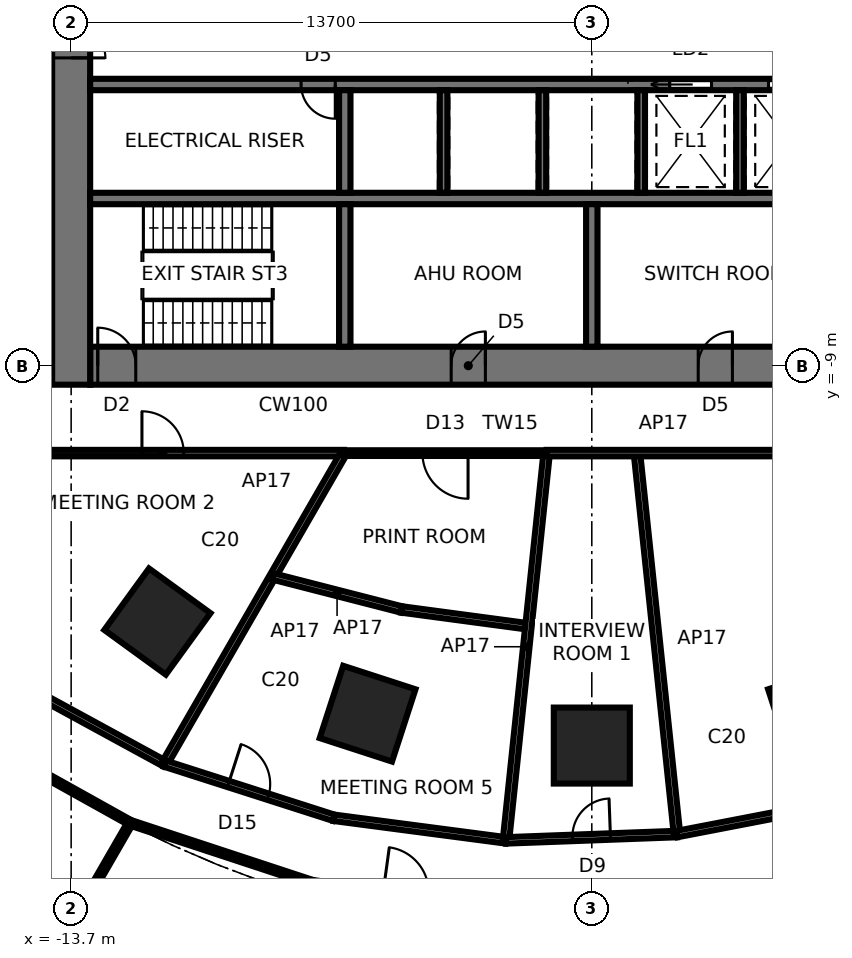
"""IFC4 building model, lengths in metres.
Left out: names, types, materials, properties, quantities, classifications, styles, units other than length and angle.
Written with IfcOpenShell. Run it as: python <this file> out.ifc"""

import sys

from ifc_helpers import new_model, si_unit, direction, frame, frame_2d, origin, origin_2d, place, context, subcontext, project, spatial, rectangle, extrude, element, fill, save


model = new_model("IFC4")
c1 = context("Model", 3, precision=1e-05, world=origin(), true_north=direction((0.0, 1.0)))
c2 = subcontext(c1, "Body", "Model", "MODEL_VIEW")
j1 = project(units=[si_unit("LENGTHUNIT", "METRE"), si_unit("PLANEANGLEUNIT", "RADIAN")], contexts=[c1])
p1 = place(None, origin())
s1 = spatial("IfcSite", under=j1, at=p1, CompositionType="ELEMENT")
p2 = place(p1, origin())
s2 = spatial("IfcBuilding", under=s1, at=p2, CompositionType="ELEMENT")
p3 = place(p2, frame((0.0, 0.0, 5.6)))
s3 = spatial("IfcBuildingStorey", under=s2, at=p3, CompositionType="ELEMENT", Elevation=5.6)
for number, where, z_axis, x_axis in (
    (1, (-11.43, -15.733, 0.0), (0.0, 0.0, 1.0), (-0.588, -0.809, 0.0)),
    (2, (-5.9, -18.157, 0.0), (0.0, 0.0, 1.0), (-0.309, -0.951, 0.0)),
    (3, (0.0, -18.996, 0.0), (0.0, 0.0, 1.0), (0.0, -1.0, 0.0)),
    (4, (5.9, -18.157, 0.0), (0.0, 0.0, 1.0), (0.309, -0.951, 0.0)),
):
    element("IfcColumn", number, at=place(p3, frame(where, z_axis=z_axis, x_axis=x_axis)), inside=s3, PredefinedType="COLUMN", context=c2, shape_type="SweptSolid", body=[
        extrude(rectangle(XDim=2.0, YDim=2.0, at=origin_2d()), origin(), (0.0, 0.0, 1.0), 5.0),
    ])
p4 = place(p3, frame((-13.2, -9.0, 0.0), z_axis=(0.0, 0.0, 1.0), x_axis=(1.0, 0.0, 0.0)))
e5 = element("IfcWall", 5, at=p4, inside=s3, PredefinedType="SHEAR", context=c2, shape_type="SweptSolid", body=[
    extrude(rectangle(XDim=26.4, YDim=1.0, at=frame_2d((13.2, 0.0))), origin(), (0.0, 0.0, 1.0), 5.0),
])
p5 = place(p4, frame((0.2, 0.0, 0.0)))
e6 = element("IfcOpeningElement", 6, at=p5, cuts=e5, PredefinedType="OPENING", context=c2, shape_type="SweptSolid", body=[
    extrude(rectangle(XDim=1.0, YDim=2.1, at=frame_2d((0.5, 1.05))), frame((0.0, 0.51, 0.0), z_axis=(0.0, -1.0, 0.0), x_axis=(1.0, 0.0, 0.0)), (0.0, 0.0, 1.0), 1.02),
])
p6 = place(p4, frame((9.5, 0.0, 0.0)))
e7 = element("IfcOpeningElement", 7, at=p6, cuts=e5, PredefinedType="OPENING", context=c2, shape_type="SweptSolid", body=[
    extrude(rectangle(XDim=0.9, YDim=2.1, at=frame_2d((0.45, 1.05))), frame((0.0, 0.51, 0.0), z_axis=(0.0, -1.0, 0.0), x_axis=(1.0, 0.0, 0.0)), (0.0, 0.0, 1.0), 1.02),
])
p7 = place(p4, frame((16.0, 0.0, 0.0)))
e8 = element("IfcOpeningElement", 8, at=p7, cuts=e5, PredefinedType="OPENING", context=c2, shape_type="SweptSolid", body=[
    extrude(rectangle(XDim=0.9, YDim=2.1, at=frame_2d((0.45, 1.05))), frame((0.0, 0.51, 0.0), z_axis=(0.0, -1.0, 0.0), x_axis=(1.0, 0.0, 0.0)), (0.0, 0.0, 1.0), 1.02),
])
p8 = place(p4, frame((22.85, 0.0, 0.0)))
e9 = element("IfcOpeningElement", 9, at=p8, cuts=e5, PredefinedType="OPENING", context=c2, shape_type="SweptSolid", body=[
    extrude(rectangle(XDim=0.9, YDim=2.1, at=frame_2d((0.45, 1.05))), frame((0.0, 0.51, 0.0), z_axis=(0.0, -1.0, 0.0), x_axis=(1.0, 0.0, 0.0)), (0.0, 0.0, 1.0), 1.02),
])
p9 = place(p3, frame((-13.7, 9.5, 0.0), z_axis=(0.0, 0.0, 1.0), x_axis=(0.0, -1.0, 0.0)))
e10 = element("IfcWall", 10, at=p9, inside=s3, PredefinedType="SHEAR", context=c2, shape_type="SweptSolid", body=[
    extrude(rectangle(XDim=19.0, YDim=1.0, at=frame_2d((9.5, 0.0))), origin(), (0.0, 0.0, 1.0), 5.0),
])
p10 = place(p9, frame((8.6, 0.0, 0.0)))
e11 = element("IfcOpeningElement", 11, at=p10, cuts=e10, PredefinedType="OPENING", context=c2, shape_type="SweptSolid", body=[
    extrude(rectangle(XDim=1.8, YDim=2.4, at=frame_2d((0.9, 1.2))), frame((0.0, 0.51, 0.0), z_axis=(0.0, -1.0, 0.0), x_axis=(1.0, 0.0, 0.0)), (0.0, 0.0, 1.0), 1.02),
])
p11 = place(p3, frame((-13.2, -1.6, 0.0), z_axis=(0.0, 0.0, 1.0), x_axis=(1.0, 0.0, 0.0)))
e12 = element("IfcWall", 12, at=p11, inside=s3, PredefinedType="SHEAR", context=c2, shape_type="SweptSolid", body=[
    extrude(rectangle(XDim=26.4, YDim=0.3, at=frame_2d((13.2, 0.0))), origin(), (0.0, 0.0, 1.0), 5.0),
])
p12 = place(p11, frame((25.15, 0.0, 0.0)))
e13 = element("IfcOpeningElement", 13, at=p12, cuts=e12, PredefinedType="OPENING", context=c2, shape_type="SweptSolid", body=[
    extrude(rectangle(XDim=1.0, YDim=2.1, at=frame_2d((0.5, 1.05))), frame((0.0, 0.16, 0.0), z_axis=(0.0, -1.0, 0.0), x_axis=(1.0, 0.0, 0.0)), (0.0, 0.0, 1.0), 0.32),
])
p13 = place(p11, frame((15.25, 0.0, 0.0)))
e14 = element("IfcOpeningElement", 14, at=p13, cuts=e12, PredefinedType="OPENING", context=c2, shape_type="SweptSolid", body=[
    extrude(rectangle(XDim=1.1, YDim=2.3, at=frame_2d((0.55, 1.15))), frame((0.0, 0.16, 0.0), z_axis=(0.0, -1.0, 0.0), x_axis=(1.0, 0.0, 0.0)), (0.0, 0.0, 1.0), 0.32),
])
p14 = place(p11, frame((17.85, 0.0, 0.0)))
e15 = element("IfcOpeningElement", 15, at=p14, cuts=e12, PredefinedType="OPENING", context=c2, shape_type="SweptSolid", body=[
    extrude(rectangle(XDim=1.1, YDim=2.3, at=frame_2d((0.55, 1.15))), frame((0.0, 0.16, 0.0), z_axis=(0.0, -1.0, 0.0), x_axis=(1.0, 0.0, 0.0)), (0.0, 0.0, 1.0), 0.32),
])
p15 = place(p11, frame((5.55, 0.0, 0.0)))
e16 = element("IfcOpeningElement", 16, at=p15, cuts=e12, PredefinedType="OPENING", context=c2, shape_type="SweptSolid", body=[
    extrude(rectangle(XDim=0.9, YDim=2.1, at=frame_2d((0.45, 1.05))), frame((0.0, 0.16, 0.0), z_axis=(0.0, -1.0, 0.0), x_axis=(1.0, 0.0, 0.0)), (0.0, 0.0, 1.0), 0.32),
])
p16 = place(p3, frame((-13.2, -4.6, 0.0), z_axis=(0.0, 0.0, 1.0), x_axis=(1.0, 0.0, 0.0)))
e17 = element("IfcWall", 17, at=p16, inside=s3, PredefinedType="SHEAR", context=c2, shape_type="SweptSolid", body=[
    extrude(rectangle(XDim=26.4, YDim=0.3, at=frame_2d((13.2, 0.0))), origin(), (0.0, 0.0, 1.0), 5.0),
])
p17 = place(p3, frame((-6.5, -1.75, 0.0), z_axis=(0.0, 0.0, 1.0), x_axis=(0.0, -1.0, 0.0)))
e18 = element("IfcWall", 18, at=p17, inside=s3, PredefinedType="SHEAR", context=c2, shape_type="SweptSolid", body=[
    extrude(rectangle(XDim=2.7, YDim=0.3, at=frame_2d((1.35, 0.0))), origin(), (0.0, 0.0, 1.0), 5.0),
])
p18 = place(p3, frame((-6.5, -4.75, 0.0), z_axis=(0.0, 0.0, 1.0), x_axis=(0.0, -1.0, 0.0)))
e19 = element("IfcWall", 19, at=p18, inside=s3, PredefinedType="SHEAR", context=c2, shape_type="SweptSolid", body=[
    extrude(rectangle(XDim=3.75, YDim=0.3, at=frame_2d((1.875, 0.0))), origin(), (0.0, 0.0, 1.0), 5.0),
])
for number, where, z_axis, x_axis in (
    (20, (-3.9, -1.75, 0.0), (0.0, 0.0, 1.0), (0.0, -1.0, 0.0)),
    (21, (-1.3, -1.75, 0.0), (0.0, 0.0, 1.0), (0.0, -1.0, 0.0)),
    (22, (1.3, -1.75, 0.0), (0.0, 0.0, 1.0), (0.0, -1.0, 0.0)),
    (23, (3.9, -1.75, 0.0), (0.0, 0.0, 1.0), (0.0, -1.0, 0.0)),
):
    element("IfcWall", number, at=place(p3, frame(where, z_axis=z_axis, x_axis=x_axis)), inside=s3, PredefinedType="SHEAR", context=c2, shape_type="SweptSolid", body=[
        extrude(rectangle(XDim=2.7, YDim=0.2, at=frame_2d((1.35, 0.0))), origin(), (0.0, 0.0, 1.0), 5.0),
    ])
p19 = place(p3, frame((0.0, -4.75, 0.0), z_axis=(0.0, 0.0, 1.0), x_axis=(0.0, -1.0, 0.0)))
e24 = element("IfcWall", 24, at=p19, inside=s3, PredefinedType="SHEAR", context=c2, shape_type="SweptSolid", body=[
    extrude(rectangle(XDim=3.75, YDim=0.3, at=frame_2d((1.875, 0.0))), origin(), (0.0, 0.0, 1.0), 5.0),
])
p20 = place(p3, frame((-16.0, -11.3, 0.0), z_axis=(0.0, 0.0, 1.0), x_axis=(1.0, 0.0, 0.0)))
e25 = element("IfcWall", 25, at=p20, inside=s3, PredefinedType="PARTITIONING", context=c2, shape_type="SweptSolid", body=[
    extrude(rectangle(XDim=9.476, YDim=0.17, at=frame_2d((4.738, 0.0))), origin(), (0.0, 0.0, 1.0), 4.8),
])
p21 = place(p20, frame((4.163, 0.0, 0.0)))
e26 = element("IfcOpeningElement", 26, at=p21, cuts=e25, PredefinedType="OPENING", context=c2, shape_type="SweptSolid", body=[
    extrude(rectangle(XDim=1.1, YDim=2.4, at=frame_2d((0.55, 1.2))), frame((0.0, 0.095, 0.0), z_axis=(0.0, -1.0, 0.0), x_axis=(1.0, 0.0, 0.0)), (0.0, 0.0, 1.0), 0.19),
])
p22 = place(p3, frame((-11.241, -19.47, 0.0), z_axis=(0.0, 0.0, 1.0), x_axis=(-0.877969347956, 0.478716851646, 0.0)))
e27 = element("IfcWall", 27, at=p22, inside=s3, PredefinedType="PARTITIONING", context=c2, shape_type="SweptSolid", body=[
    extrude(rectangle(XDim=4.805, YDim=0.17, at=frame_2d((2.403, 0.0))), origin(), (0.0, 0.0, 1.0), 4.8),
])
p23 = place(p3, frame((-16.664, -18.507, 0.0), z_axis=(0.0, 0.0, 1.0), x_axis=(0.873440229319, -0.486931376898, 0.0)))
e28 = element("IfcWall", 28, at=p23, inside=s3, PredefinedType="PARTITIONING", context=c2, shape_type="SweptSolid", body=[
    extrude(rectangle(XDim=5.178, YDim=0.15, at=frame_2d((2.589, 0.0))), origin(), (0.0, 0.0, 1.0), 4.8),
])
p24 = place(p3, frame((-6.524, -11.3, 0.0), z_axis=(0.0, 0.0, 1.0), x_axis=(-0.499991277142, -0.86603043987, 0.0)))
e29 = element("IfcWall", 29, at=p24, inside=s3, PredefinedType="PARTITIONING", context=c2, shape_type="SweptSolid", body=[
    extrude(rectangle(XDim=9.434, YDim=0.17, at=frame_2d((4.717, 0.0))), origin(), (0.0, 0.0, 1.0), 4.8),
])
p25 = place(p3, frame((-12.141, -21.029, 0.0), z_axis=(0.0, 0.0, 1.0), x_axis=(-0.500001376791, -0.866024608893, 0.0)))
e30 = element("IfcWall", 30, at=p25, inside=s3, PredefinedType="PARTITIONING", context=c2, shape_type="SweptSolid", body=[
    extrude(rectangle(XDim=10.81, YDim=0.15, at=frame_2d((5.405, 0.0))), origin(), (0.0, 0.0, 1.0), 4.8),
])
p26 = place(p3, frame((-5.008, -15.414, 0.0), z_axis=(0.0, 0.0, 1.0), x_axis=(-0.968562622374, 0.248769866625, 0.0)))
e31 = element("IfcWall", 31, at=p26, inside=s3, PredefinedType="PARTITIONING", context=c2, shape_type="SweptSolid", body=[
    extrude(rectangle(XDim=3.499, YDim=0.17, at=frame_2d((1.75, 0.0))), origin(), (0.0, 0.0, 1.0), 4.8),
])
p27 = place(p3, frame((-6.79, -20.896, 0.0), z_axis=(0.0, 0.0, 1.0), x_axis=(-0.952311283162, 0.305128202503, 0.0)))
e32 = element("IfcWall", 32, at=p27, inside=s3, PredefinedType="PARTITIONING", context=c2, shape_type="SweptSolid", body=[
    extrude(rectangle(XDim=4.674, YDim=0.17, at=frame_2d((2.337, 0.0))), origin(), (0.0, 0.0, 1.0), 4.8),
])
p28 = place(p27, frame((1.812, 0.0, 0.0)))
e33 = element("IfcOpeningElement", 33, at=p28, cuts=e32, PredefinedType="OPENING", context=c2, shape_type="SweptSolid", body=[
    extrude(rectangle(XDim=1.1, YDim=2.4, at=frame_2d((0.55, 1.2))), frame((0.0, 0.095, 0.0), z_axis=(0.0, -1.0, 0.0), x_axis=(1.0, 0.0, 0.0)), (0.0, 0.0, 1.0), 0.19),
])
p29 = place(p3, frame((-12.141, -21.029, 0.0), z_axis=(0.0, 0.0, 1.0), x_axis=(0.949808812445, -0.312830976412, 0.0)))
e34 = element("IfcWall", 34, at=p29, inside=s3, PredefinedType="PARTITIONING", context=c2, shape_type="SweptSolid", body=[
    extrude(rectangle(XDim=5.049, YDim=0.15, at=frame_2d((2.524, 0.0))), origin(), (0.0, 0.0, 1.0), 4.8),
])
p30 = place(p3, frame((-6.524, -11.3, 0.0), z_axis=(0.0, 0.0, 1.0), x_axis=(1.0, 0.0, 0.0)))
e35 = element("IfcWall", 35, at=p30, inside=s3, PredefinedType="PARTITIONING", context=c2, shape_type="SweptSolid", body=[
    extrude(rectangle(XDim=5.336, YDim=0.15, at=frame_2d((2.668, 0.0))), origin(), (0.0, 0.0, 1.0), 4.8),
])
p31 = place(p30, frame((2.068, 0.0, 0.0)))
e36 = element("IfcOpeningElement", 36, at=p31, cuts=e35, PredefinedType="OPENING", context=c2, shape_type="SweptSolid", body=[
    extrude(rectangle(XDim=1.2, YDim=2.4, at=frame_2d((0.6, 1.2))), frame((0.0, 0.085, 0.0), z_axis=(0.0, -1.0, 0.0), x_axis=(1.0, 0.0, 0.0)), (0.0, 0.0, 1.0), 0.17),
])
p32 = place(p3, frame((-2.259, -21.491, 0.0), z_axis=(0.0, 0.0, 1.0), x_axis=(-0.991487722643, 0.130200214467, 0.0)))
e37 = element("IfcWall", 37, at=p32, inside=s3, PredefinedType="PARTITIONING", context=c2, shape_type="SweptSolid", body=[
    extrude(rectangle(XDim=4.57, YDim=0.17, at=frame_2d((2.285, 0.0))), origin(), (0.0, 0.0, 1.0), 4.8),
])
p33 = place(p3, frame((-1.667, -15.861, 0.0), z_axis=(0.0, 0.0, 1.0), x_axis=(-0.991178495561, 0.132533731322, 0.0)))
e38 = element("IfcWall", 38, at=p33, inside=s3, PredefinedType="PARTITIONING", context=c2, shape_type="SweptSolid", body=[
    extrude(rectangle(XDim=3.371, YDim=0.17, at=frame_2d((1.686, 0.0))), origin(), (0.0, 0.0, 1.0), 4.8),
])
p34 = place(p3, frame((-2.259, -21.491, 0.0), z_axis=(0.0, 0.0, 1.0), x_axis=(0.104519836442, 0.994522802046, 0.0)))
e39 = element("IfcWall", 39, at=p34, inside=s3, PredefinedType="PARTITIONING", context=c2, shape_type="SweptSolid", body=[
    extrude(rectangle(XDim=10.247, YDim=0.17, at=frame_2d((5.124, 0.0))), origin(), (0.0, 0.0, 1.0), 4.8),
])
p35 = place(p3, frame((2.241, -21.325, 0.0), z_axis=(0.0, 0.0, 1.0), x_axis=(-0.999316169957, -0.03697556575, 0.0)))
e40 = element("IfcWall", 40, at=p35, inside=s3, PredefinedType="PARTITIONING", context=c2, shape_type="SweptSolid", body=[
    extrude(rectangle(XDim=4.503, YDim=0.17, at=frame_2d((2.251, 0.0))), origin(), (0.0, 0.0, 1.0), 4.8),
])
p36 = place(p35, frame((1.752, 0.0, 0.0)))
e41 = element("IfcOpeningElement", 41, at=p36, cuts=e40, PredefinedType="OPENING", context=c2, shape_type="SweptSolid", body=[
    extrude(rectangle(XDim=1.0, YDim=2.4, at=frame_2d((0.5, 1.2))), frame((0.0, 0.095, 0.0), z_axis=(0.0, -1.0, 0.0), x_axis=(1.0, 0.0, 0.0)), (0.0, 0.0, 1.0), 0.19),
])
p37 = place(p3, frame((1.188, -11.3, 0.0), z_axis=(0.0, 0.0, 1.0), x_axis=(0.104512053293, -0.994523619989, 0.0)))
e42 = element("IfcWall", 42, at=p37, inside=s3, PredefinedType="PARTITIONING", context=c2, shape_type="SweptSolid", body=[
    extrude(rectangle(XDim=10.08, YDim=0.17, at=frame_2d((5.04, 0.0))), origin(), (0.0, 0.0, 1.0), 4.8),
])
p38 = place(p3, frame((2.429, -23.115, 0.0), z_axis=(0.0, 0.0, 1.0), x_axis=(0.981647737098, 0.190703225592, 0.0)))
e43 = element("IfcWall", 43, at=p38, inside=s3, PredefinedType="PARTITIONING", context=c2, shape_type="SweptSolid", body=[
    extrude(rectangle(XDim=4.869, YDim=0.15, at=frame_2d((2.434, 0.0))), origin(), (0.0, 0.0, 1.0), 4.8),
])
p39 = place(p3, frame((6.653, -20.475, 0.0), z_axis=(0.0, 0.0, 1.0), x_axis=(-0.981933890717, -0.189224296169, 0.0)))
e44 = element("IfcWall", 44, at=p39, inside=s3, PredefinedType="PARTITIONING", context=c2, shape_type="SweptSolid", body=[
    extrude(rectangle(XDim=4.492, YDim=0.17, at=frame_2d((2.246, 0.0))), origin(), (0.0, 0.0, 1.0), 4.8),
])
p40 = place(p3, frame((-1.188, -11.3, 0.0), z_axis=(0.0, 0.0, 1.0), x_axis=(1.0, 0.0, 0.0)))
e45 = element("IfcWall", 45, at=p40, inside=s3, PredefinedType="PARTITIONING", context=c2, shape_type="SweptSolid", body=[
    extrude(rectangle(XDim=17.188, YDim=0.17, at=frame_2d((8.594, 0.0))), origin(), (0.0, 0.0, 1.0), 4.8),
])
p41 = place(p40, frame((6.294, 0.0, 0.0)))
e46 = element("IfcOpeningElement", 46, at=p41, cuts=e45, PredefinedType="OPENING", context=c2, shape_type="SweptSolid", body=[
    extrude(rectangle(XDim=1.1, YDim=2.4, at=frame_2d((0.55, 1.2))), frame((0.0, 0.095, 0.0), z_axis=(0.0, -1.0, 0.0), x_axis=(1.0, 0.0, 0.0)), (0.0, 0.0, 1.0), 0.19),
])
p42 = place(p40, frame((13.775, 0.0, 0.0)))
e47 = element("IfcOpeningElement", 47, at=p42, cuts=e45, PredefinedType="OPENING", context=c2, shape_type="SweptSolid", body=[
    extrude(rectangle(XDim=1.0, YDim=2.4, at=frame_2d((0.5, 1.2))), frame((0.0, 0.095, 0.0), z_axis=(0.0, -1.0, 0.0), x_axis=(1.0, 0.0, 0.0)), (0.0, 0.0, 1.0), 0.19),
])
p43 = place(p10, origin())
e48 = element("IfcDoor", 48, at=p43, inside=s3, OperationType="DOUBLE_DOOR_SINGLE_SWING", PredefinedType="DOOR", context=c2, shape_type="SweptSolid", body=[
    extrude(rectangle(XDim=1.72, YDim=2.36, at=frame_2d((0.9, 1.18))), frame((0.0, 0.025, 0.0), z_axis=(0.0, -1.0, 0.0), x_axis=(1.0, 0.0, 0.0)), (0.0, 0.0, 1.0), 0.05),
    extrude(rectangle(XDim=0.04, YDim=2.4, at=frame_2d((0.02, 1.2))), frame((0.0, 0.25, 0.0), z_axis=(0.0, -1.0, 0.0), x_axis=(1.0, 0.0, 0.0)), (0.0, 0.0, 1.0), 0.5),
    extrude(rectangle(XDim=0.04, YDim=2.4, at=frame_2d((1.78, 1.2))), frame((0.0, 0.25, 0.0), z_axis=(0.0, -1.0, 0.0), x_axis=(1.0, 0.0, 0.0)), (0.0, 0.0, 1.0), 0.5),
    extrude(rectangle(XDim=1.72, YDim=0.04, at=frame_2d((0.9, 2.38))), frame((0.0, 0.25, 0.0), z_axis=(0.0, -1.0, 0.0), x_axis=(1.0, 0.0, 0.0)), (0.0, 0.0, 1.0), 0.5),
])
fill(e11, e48)
p44 = place(p5, origin())
e49 = element("IfcDoor", 49, at=p44, inside=s3, OperationType="SINGLE_SWING_LEFT", PredefinedType="DOOR", context=c2, shape_type="SweptSolid", body=[
    extrude(rectangle(XDim=0.92, YDim=2.06, at=frame_2d((0.5, 1.03))), frame((0.0, 0.025, 0.0), z_axis=(0.0, -1.0, 0.0), x_axis=(1.0, 0.0, 0.0)), (0.0, 0.0, 1.0), 0.05),
    extrude(rectangle(XDim=0.04, YDim=2.1, at=frame_2d((0.02, 1.05))), frame((0.0, 0.25, 0.0), z_axis=(0.0, -1.0, 0.0), x_axis=(1.0, 0.0, 0.0)), (0.0, 0.0, 1.0), 0.5),
    extrude(rectangle(XDim=0.04, YDim=2.1, at=frame_2d((0.98, 1.05))), frame((0.0, 0.25, 0.0), z_axis=(0.0, -1.0, 0.0), x_axis=(1.0, 0.0, 0.0)), (0.0, 0.0, 1.0), 0.5),
    extrude(rectangle(XDim=0.92, YDim=0.04, at=frame_2d((0.5, 2.08))), frame((0.0, 0.25, 0.0), z_axis=(0.0, -1.0, 0.0), x_axis=(1.0, 0.0, 0.0)), (0.0, 0.0, 1.0), 0.5),
])
fill(e6, e49)
p45 = place(p13, frame((1.1, 0.0, 0.0), z_axis=(0.0, 0.0, 1.0), x_axis=(-1.0, 0.0, 0.0)))
e50 = element("IfcDoor", 50, at=p45, inside=s3, OperationType="SLIDING_TO_RIGHT", PredefinedType="DOOR", context=c2, shape_type="SweptSolid", body=[
    extrude(rectangle(XDim=1.1, YDim=2.3, at=frame_2d((0.55, 1.15))), frame((0.0, 0.025, 0.0), z_axis=(0.0, -1.0, 0.0), x_axis=(1.0, 0.0, 0.0)), (0.0, 0.0, 1.0), 0.05),
])
fill(e14, e50)
p46 = place(p14, frame((1.1, 0.0, 0.0), z_axis=(0.0, 0.0, 1.0), x_axis=(-1.0, 0.0, 0.0)))
e51 = element("IfcDoor", 51, at=p46, inside=s3, OperationType="SLIDING_TO_LEFT", PredefinedType="DOOR", context=c2, shape_type="SweptSolid", body=[
    extrude(rectangle(XDim=1.1, YDim=2.3, at=frame_2d((0.55, 1.15))), frame((0.0, 0.025, 0.0), z_axis=(0.0, -1.0, 0.0), x_axis=(1.0, 0.0, 0.0)), (0.0, 0.0, 1.0), 0.05),
])
fill(e15, e51)
p47 = place(p15, frame((0.9, 0.0, 0.0), z_axis=(0.0, 0.0, 1.0), x_axis=(-1.0, 0.0, 0.0)))
e52 = element("IfcDoor", 52, at=p47, inside=s3, OperationType="SINGLE_SWING_LEFT", PredefinedType="DOOR", context=c2, shape_type="SweptSolid", body=[
    extrude(rectangle(XDim=0.9, YDim=2.1, at=frame_2d((0.45, 1.05))), frame((0.0, 0.025, 0.0), z_axis=(0.0, -1.0, 0.0), x_axis=(1.0, 0.0, 0.0)), (0.0, 0.0, 1.0), 0.05),
])
fill(e16, e52)
p48 = place(p6, origin())
e53 = element("IfcDoor", 53, at=p48, inside=s3, OperationType="SINGLE_SWING_RIGHT", PredefinedType="DOOR", context=c2, shape_type="SweptSolid", body=[
    extrude(rectangle(XDim=0.82, YDim=2.06, at=frame_2d((0.45, 1.03))), frame((0.0, 0.025, 0.0), z_axis=(0.0, -1.0, 0.0), x_axis=(1.0, 0.0, 0.0)), (0.0, 0.0, 1.0), 0.05),
    extrude(rectangle(XDim=0.04, YDim=2.1, at=frame_2d((0.02, 1.05))), frame((0.0, 0.25, 0.0), z_axis=(0.0, -1.0, 0.0), x_axis=(1.0, 0.0, 0.0)), (0.0, 0.0, 1.0), 0.5),
    extrude(rectangle(XDim=0.04, YDim=2.1, at=frame_2d((0.88, 1.05))), frame((0.0, 0.25, 0.0), z_axis=(0.0, -1.0, 0.0), x_axis=(1.0, 0.0, 0.0)), (0.0, 0.0, 1.0), 0.5),
    extrude(rectangle(XDim=0.82, YDim=0.04, at=frame_2d((0.45, 2.08))), frame((0.0, 0.25, 0.0), z_axis=(0.0, -1.0, 0.0), x_axis=(1.0, 0.0, 0.0)), (0.0, 0.0, 1.0), 0.5),
])
fill(e7, e53)
p49 = place(p7, origin())
e54 = element("IfcDoor", 54, at=p49, inside=s3, OperationType="SINGLE_SWING_RIGHT", PredefinedType="DOOR", context=c2, shape_type="SweptSolid", body=[
    extrude(rectangle(XDim=0.82, YDim=2.06, at=frame_2d((0.45, 1.03))), frame((0.0, 0.025, 0.0), z_axis=(0.0, -1.0, 0.0), x_axis=(1.0, 0.0, 0.0)), (0.0, 0.0, 1.0), 0.05),
    extrude(rectangle(XDim=0.04, YDim=2.1, at=frame_2d((0.02, 1.05))), frame((0.0, 0.25, 0.0), z_axis=(0.0, -1.0, 0.0), x_axis=(1.0, 0.0, 0.0)), (0.0, 0.0, 1.0), 0.5),
    extrude(rectangle(XDim=0.04, YDim=2.1, at=frame_2d((0.88, 1.05))), frame((0.0, 0.25, 0.0), z_axis=(0.0, -1.0, 0.0), x_axis=(1.0, 0.0, 0.0)), (0.0, 0.0, 1.0), 0.5),
    extrude(rectangle(XDim=0.82, YDim=0.04, at=frame_2d((0.45, 2.08))), frame((0.0, 0.25, 0.0), z_axis=(0.0, -1.0, 0.0), x_axis=(1.0, 0.0, 0.0)), (0.0, 0.0, 1.0), 0.5),
])
fill(e8, e54)
p50 = place(p21, origin())
e55 = element("IfcDoor", 55, at=p50, inside=s3, OperationType="SINGLE_SWING_LEFT", PredefinedType="DOOR", context=c2, shape_type="SweptSolid", body=[
    extrude(rectangle(XDim=1.1, YDim=2.4, at=frame_2d((0.55, 1.2))), frame((0.0, 0.025, 0.0), z_axis=(0.0, -1.0, 0.0), x_axis=(1.0, 0.0, 0.0)), (0.0, 0.0, 1.0), 0.05),
])
fill(e26, e55)
p51 = place(p36, frame((1.0, 0.0, 0.0), z_axis=(0.0, 0.0, 1.0), x_axis=(-1.0, 0.0, 0.0)))
e56 = element("IfcDoor", 56, at=p51, inside=s3, OperationType="SINGLE_SWING_RIGHT", PredefinedType="DOOR", context=c2, shape_type="SweptSolid", body=[
    extrude(rectangle(XDim=1.0, YDim=2.4, at=frame_2d((0.5, 1.2))), frame((0.0, 0.025, 0.0), z_axis=(0.0, -1.0, 0.0), x_axis=(1.0, 0.0, 0.0)), (0.0, 0.0, 1.0), 0.05),
])
fill(e41, e56)
p52 = place(p31, frame((1.2, 0.0, 0.0), z_axis=(0.0, 0.0, 1.0), x_axis=(-1.0, 0.0, 0.0)))
e57 = element("IfcDoor", 57, at=p52, inside=s3, OperationType="SINGLE_SWING_LEFT", PredefinedType="DOOR", context=c2, shape_type="SweptSolid", body=[
    extrude(rectangle(XDim=1.2, YDim=2.4, at=frame_2d((0.6, 1.2))), frame((0.0, 0.025, 0.0), z_axis=(0.0, -1.0, 0.0), x_axis=(1.0, 0.0, 0.0)), (0.0, 0.0, 1.0), 0.05),
])
fill(e36, e57)
p53 = place(p28, frame((1.1, 0.0, 0.0), z_axis=(0.0, 0.0, 1.0), x_axis=(-1.0, 0.0, 0.0)))
e58 = element("IfcDoor", 58, at=p53, inside=s3, OperationType="SINGLE_SWING_LEFT", PredefinedType="DOOR", context=c2, shape_type="SweptSolid", body=[
    extrude(rectangle(XDim=1.1, YDim=2.4, at=frame_2d((0.55, 1.2))), frame((0.0, 0.025, 0.0), z_axis=(0.0, -1.0, 0.0), x_axis=(1.0, 0.0, 0.0)), (0.0, 0.0, 1.0), 0.05),
])
fill(e33, e58)
save(model, sys.argv[1])
